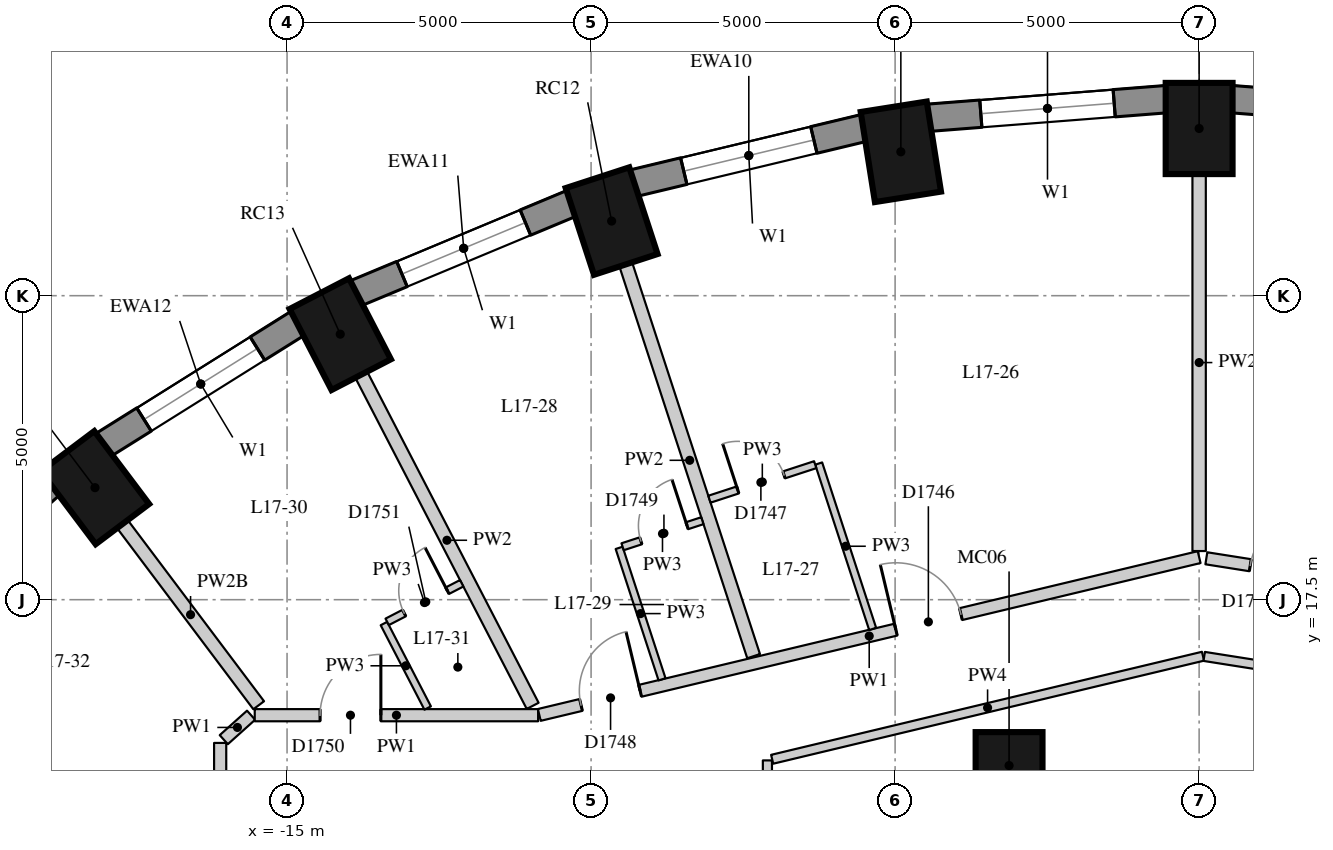
"""IFC4 building model, lengths in metres.
Left out: names, types, materials, properties, quantities, classifications, styles, units other than length and angle.
Written with IfcOpenShell. Run it as: python <this file> out.ifc"""

import sys

from ifc_helpers import new_model, si_unit, direction, frame, frame_2d, origin, origin_2d, place, context, subcontext, project, spatial, rectangle, extrude, element, fill, save


model = new_model("IFC4")
c1 = context("Model", 3, precision=1e-05, world=origin(), true_north=direction((0.0, 1.0)))
c2 = subcontext(c1, "Body", "Model", "MODEL_VIEW")
j1 = project(units=[si_unit("LENGTHUNIT", "METRE"), si_unit("PLANEANGLEUNIT", "RADIAN")], contexts=[c1])
p1 = place(None, origin())
s1 = spatial("IfcSite", under=j1, at=p1, CompositionType="ELEMENT")
p2 = place(p1, origin())
s2 = spatial("IfcBuilding", under=s1, at=p2, CompositionType="ELEMENT")
p3 = place(p2, frame((0.0, 0.0, 64.6)))
s3 = spatial("IfcBuildingStorey", under=s2, at=p3, CompositionType="ELEMENT", Elevation=64.6)
for number, where, z_axis, x_axis in (
    (1, (0.0, 25.25, 0.0), (0.0, 0.0, 1.0), (0.0, 1.0, 0.0)),
    (2, (-4.906, 24.866, 0.0), (0.0, 0.0, 1.0), (-0.156, 0.988, 0.0)),
    (3, (-9.662, 23.727, 0.0), (0.0, 0.0, 1.0), (-0.31, 0.951, 0.0)),
    (4, (-14.125, 21.867, 0.0), (0.0, 0.0, 1.0), (-0.46, 0.888, 0.0)),
    (5, (-18.159, 19.343, 0.0), (0.0, 0.0, 1.0), (-0.601, 0.799, 0.0)),
):
    element("IfcColumn", number, at=place(p3, frame(where, z_axis=z_axis, x_axis=x_axis)), inside=s3, PredefinedType="COLUMN", context=c2, shape_type="SweptSolid", body=[
        extrude(rectangle(XDim=1.5, YDim=1.1, at=origin_2d()), origin(), (0.0, 0.0, 1.0), 3.3),
    ])
p4 = place(p3, frame((-3.126, 14.772, 0.0), z_axis=(0.0, 0.0, 1.0), x_axis=(1.0, 0.0, 0.0)))
e6 = element("IfcColumn", 6, at=p4, inside=s3, PredefinedType="COLUMN", context=c2, shape_type="SweptSolid", body=[
    extrude(rectangle(XDim=1.1, YDim=1.1, at=origin_2d()), origin(), (0.0, 0.0, 1.0), 3.3),
])
p5 = place(p3, frame((4.457, 25.426, 0.0), z_axis=(0.0, 0.0, 1.0), x_axis=(-0.996955972145, 0.077966592873, 0.0)))
e7 = element("IfcWall", 7, at=p5, inside=s3, PredefinedType="SOLIDWALL", context=c2, shape_type="SweptSolid", body=[
    extrude(rectangle(XDim=3.939, YDim=0.45, at=frame_2d((1.97, 0.0))), origin(), (0.0, 0.0, 1.0), 3.02),
])
p6 = place(p5, frame((0.87, 0.0, 0.4)))
e8 = element("IfcOpeningElement", 8, at=p6, cuts=e7, PredefinedType="OPENING", context=c2, shape_type="SweptSolid", body=[
    extrude(rectangle(XDim=2.2, YDim=1.75, at=frame_2d((1.1, 0.875))), frame((0.0, 0.235, 0.0), z_axis=(0.0, -1.0, 0.0), x_axis=(1.0, 0.0, 0.0)), (0.0, 0.0, 1.0), 0.47),
])
p7 = place(p3, frame((-0.53, 25.733, 0.0), z_axis=(0.0, 0.0, 1.0), x_axis=(-0.996955972145, -0.077966592873, 0.0)))
e9 = element("IfcWall", 9, at=p7, inside=s3, PredefinedType="SOLIDWALL", context=c2, shape_type="SweptSolid", body=[
    extrude(rectangle(XDim=3.939, YDim=0.45, at=frame_2d((1.97, 0.0))), origin(), (0.0, 0.0, 1.0), 3.02),
])
p8 = place(p7, frame((0.87, 0.0, 0.4)))
e10 = element("IfcOpeningElement", 10, at=p8, cuts=e9, PredefinedType="OPENING", context=c2, shape_type="SweptSolid", body=[
    extrude(rectangle(XDim=2.2, YDim=1.75, at=frame_2d((1.1, 0.875))), frame((0.0, 0.235, 0.0), z_axis=(0.0, -1.0, 0.0), x_axis=(1.0, 0.0, 0.0)), (0.0, 0.0, 1.0), 0.47),
])
p9 = place(p3, frame((-5.504, 25.26, 0.0), z_axis=(0.0, 0.0, 1.0), x_axis=(-0.972496561493, -0.232917233979, 0.0)))
e11 = element("IfcWall", 11, at=p9, inside=s3, PredefinedType="SOLIDWALL", context=c2, shape_type="SweptSolid", body=[
    extrude(rectangle(XDim=3.911, YDim=0.45, at=frame_2d((1.956, 0.0))), origin(), (0.0, 0.0, 1.0), 3.02),
])
p10 = place(p9, frame((0.855, 0.0, 0.4)))
e12 = element("IfcOpeningElement", 12, at=p10, cuts=e11, PredefinedType="OPENING", context=c2, shape_type="SweptSolid", body=[
    extrude(rectangle(XDim=2.2, YDim=1.75, at=frame_2d((1.1, 0.875))), frame((0.0, 0.235, 0.0), z_axis=(0.0, -1.0, 0.0), x_axis=(1.0, 0.0, 0.0)), (0.0, 0.0, 1.0), 0.47),
])
p11 = place(p3, frame((-10.315, 24.021, 0.0), z_axis=(0.0, 0.0, 1.0), x_axis=(-0.923031964282, -0.384723267966, 0.0)))
e13 = element("IfcWall", 13, at=p11, inside=s3, PredefinedType="SOLIDWALL", context=c2, shape_type="SweptSolid", body=[
    extrude(rectangle(XDim=3.856, YDim=0.45, at=frame_2d((1.928, 0.0))), origin(), (0.0, 0.0, 1.0), 3.02),
])
p12 = place(p11, frame((0.828, 0.0, 0.4)))
e14 = element("IfcOpeningElement", 14, at=p12, cuts=e13, PredefinedType="OPENING", context=c2, shape_type="SweptSolid", body=[
    extrude(rectangle(XDim=2.2, YDim=1.75, at=frame_2d((1.1, 0.875))), frame((0.0, 0.235, 0.0), z_axis=(0.0, -1.0, 0.0), x_axis=(1.0, 0.0, 0.0)), (0.0, 0.0, 1.0), 0.47),
])
p13 = place(p3, frame((-14.817, 22.051, 0.0), z_axis=(0.0, 0.0, 1.0), x_axis=(-0.847635480093, -0.530579016629, 0.0)))
e15 = element("IfcWall", 15, at=p13, inside=s3, PredefinedType="SOLIDWALL", context=c2, shape_type="SweptSolid", body=[
    extrude(rectangle(XDim=3.782, YDim=0.45, at=frame_2d((1.891, 0.0))), origin(), (0.0, 0.0, 1.0), 3.02),
])
p14 = place(p13, frame((0.791, 0.0, 0.4)))
e16 = element("IfcOpeningElement", 16, at=p14, cuts=e15, PredefinedType="OPENING", context=c2, shape_type="SweptSolid", body=[
    extrude(rectangle(XDim=2.2, YDim=1.75, at=frame_2d((1.1, 0.875))), frame((0.0, 0.235, 0.0), z_axis=(0.0, -1.0, 0.0), x_axis=(1.0, 0.0, 0.0)), (0.0, 0.0, 1.0), 0.47),
])
p15 = place(p3, frame((-18.871, 19.407, 0.0), z_axis=(0.0, 0.0, 1.0), x_axis=(-0.745526233716, -0.66647628228, 0.0)))
e17 = element("IfcWall", 17, at=p15, inside=s3, PredefinedType="SOLIDWALL", context=c2, shape_type="SweptSolid", body=[
    extrude(rectangle(XDim=3.697, YDim=0.45, at=frame_2d((1.848, 0.0))), origin(), (0.0, 0.0, 1.0), 3.02),
])
p16 = place(p15, frame((0.749, 0.0, 0.4)))
e18 = element("IfcOpeningElement", 18, at=p16, cuts=e17, PredefinedType="OPENING", context=c2, shape_type="SweptSolid", body=[
    extrude(rectangle(XDim=2.2, YDim=1.75, at=frame_2d((1.1, 0.875))), frame((0.0, 0.235, 0.0), z_axis=(0.0, -1.0, 0.0), x_axis=(1.0, 0.0, 0.0)), (0.0, 0.0, 1.0), 0.47),
])
p17 = place(p3, frame((-16.1, 11.047, 0.0), z_axis=(0.0, 0.0, 1.0), x_axis=(0.0, 1.0, 0.0)))
e19 = element("IfcWall", 19, at=p17, inside=s3, PredefinedType="PARTITIONING", context=c2, shape_type="SweptSolid", body=[
    extrude(rectangle(XDim=4.097, YDim=0.2, at=frame_2d((2.048, 0.0))), origin(), (0.0, 0.0, 1.0), 3.02),
])
p18 = place(p17, frame((1.499, 0.0, 0.0)))
e20 = element("IfcOpeningElement", 20, at=p18, cuts=e19, PredefinedType="OPENING", context=c2, shape_type="SweptSolid", body=[
    extrude(rectangle(XDim=1.1, YDim=2.1, at=frame_2d((0.55, 1.05))), frame((0.0, 0.11, 0.0), z_axis=(0.0, -1.0, 0.0), x_axis=(1.0, 0.0, 0.0)), (0.0, 0.0, 1.0), 0.22),
])
p19 = place(p3, frame((-16.041, 15.198, 0.0), z_axis=(0.0, 0.0, 1.0), x_axis=(0.744722115519, 0.667374685359, 0.0)))
e21 = element("IfcWall", 21, at=p19, inside=s3, PredefinedType="PARTITIONING", context=c2, shape_type="SweptSolid", body=[
    extrude(rectangle(XDim=0.603, YDim=0.2, at=frame_2d((0.301, 0.0))), origin(), (0.0, 0.0, 1.0), 3.02),
])
p20 = place(p3, frame((-15.531, 15.6, 0.0), z_axis=(0.0, 0.0, 1.0), x_axis=(1.0, 0.0, 0.0)))
e22 = element("IfcWall", 22, at=p20, inside=s3, PredefinedType="PARTITIONING", context=c2, shape_type="SweptSolid", body=[
    extrude(rectangle(XDim=4.66, YDim=0.2, at=frame_2d((2.33, 0.0))), origin(), (0.0, 0.0, 1.0), 3.02),
])
p21 = place(p20, frame((1.074, 0.0, 0.0)))
e23 = element("IfcOpeningElement", 23, at=p21, cuts=e22, PredefinedType="OPENING", context=c2, shape_type="SweptSolid", body=[
    extrude(rectangle(XDim=1.0, YDim=2.1, at=frame_2d((0.5, 1.05))), frame((0.0, 0.11, 0.0), z_axis=(0.0, -1.0, 0.0), x_axis=(1.0, 0.0, 0.0)), (0.0, 0.0, 1.0), 0.22),
])
p22 = place(p3, frame((-10.852, 15.605, 0.0), z_axis=(0.0, 0.0, 1.0), x_axis=(0.972573296372, 0.232596610431, 0.0)))
e24 = element("IfcWall", 24, at=p22, inside=s3, PredefinedType="PARTITIONING", context=c2, shape_type="SweptSolid", body=[
    extrude(rectangle(XDim=11.157, YDim=0.2, at=frame_2d((5.579, 0.0))), origin(), (0.0, 0.0, 1.0), 3.02),
])
p23 = place(p22, frame((6.029, 0.0, 0.0)))
e25 = element("IfcOpeningElement", 25, at=p23, cuts=e24, PredefinedType="OPENING", context=c2, shape_type="SweptSolid", body=[
    extrude(rectangle(XDim=1.1, YDim=2.1, at=frame_2d((0.55, 1.05))), frame((0.0, 0.11, 0.0), z_axis=(0.0, -1.0, 0.0), x_axis=(1.0, 0.0, 0.0)), (0.0, 0.0, 1.0), 0.22),
])
p24 = place(p22, frame((0.705, 0.0, 0.0)))
e26 = element("IfcOpeningElement", 26, at=p24, cuts=e24, PredefinedType="OPENING", context=c2, shape_type="SweptSolid", body=[
    extrude(rectangle(XDim=1.0, YDim=2.1, at=frame_2d((0.5, 1.05))), frame((0.0, 0.11, 0.0), z_axis=(0.0, -1.0, 0.0), x_axis=(1.0, 0.0, 0.0)), (0.0, 0.0, 1.0), 0.22),
])
p25 = place(p3, frame((0.119, 18.181, 0.0), z_axis=(0.0, 0.0, 1.0), x_axis=(0.987788122462, -0.155803161464, 0.0)))
e27 = element("IfcWall", 27, at=p25, inside=s3, PredefinedType="PARTITIONING", context=c2, shape_type="SweptSolid", body=[
    extrude(rectangle(XDim=7.471, YDim=0.2, at=frame_2d((3.736, 0.0))), origin(), (0.0, 0.0, 1.0), 3.02),
])
p26 = place(p25, frame((5.619, 0.0, 0.0)))
e28 = element("IfcOpeningElement", 28, at=p26, cuts=e27, PredefinedType="OPENING", context=c2, shape_type="SweptSolid", body=[
    extrude(rectangle(XDim=1.0, YDim=2.1, at=frame_2d((0.5, 1.05))), frame((0.0, 0.11, 0.0), z_axis=(0.0, -1.0, 0.0), x_axis=(1.0, 0.0, 0.0)), (0.0, 0.0, 1.0), 0.22),
])
p27 = place(p25, frame((0.732, 0.0, 0.0)))
e29 = element("IfcOpeningElement", 29, at=p27, cuts=e27, PredefinedType="OPENING", context=c2, shape_type="SweptSolid", body=[
    extrude(rectangle(XDim=1.0, YDim=2.1, at=frame_2d((0.5, 1.05))), frame((0.0, 0.11, 0.0), z_axis=(0.0, -1.0, 0.0), x_axis=(1.0, 0.0, 0.0)), (0.0, 0.0, 1.0), 0.22),
])
p28 = place(p3, frame((-7.1, 11.83, 0.0), z_axis=(0.0, 0.0, 1.0), x_axis=(0.0, 1.0, 0.0)))
e30 = element("IfcWall", 30, at=p28, inside=s3, PredefinedType="PARTITIONING", context=c2, shape_type="SweptSolid", body=[
    extrude(rectangle(XDim=3.027, YDim=0.15, at=frame_2d((1.513, 0.0))), origin(), (0.0, 0.0, 1.0), 3.02),
])
p29 = place(p3, frame((-7.022, 14.875, 0.0), z_axis=(0.0, 0.0, 1.0), x_axis=(0.972565872543, 0.232627650043, 0.0)))
e31 = element("IfcWall", 31, at=p29, inside=s3, PredefinedType="PARTITIONING", context=c2, shape_type="SweptSolid", body=[
    extrude(rectangle(XDim=7.286, YDim=0.15, at=frame_2d((3.643, 0.0))), origin(), (0.0, 0.0, 1.0), 3.02),
])
p30 = place(p3, frame((0.083, 16.567, 0.0), z_axis=(0.0, 0.0, 1.0), x_axis=(0.987781067139, -0.15584788546, 0.0)))
e32 = element("IfcWall", 32, at=p30, inside=s3, PredefinedType="PARTITIONING", context=c2, shape_type="SweptSolid", body=[
    extrude(rectangle(XDim=6.996, YDim=0.15, at=frame_2d((3.498, 0.0))), origin(), (0.0, 0.0, 1.0), 3.02),
])
p31 = place(p3, frame((0.0, 24.5, 0.0), z_axis=(0.0, 0.0, 1.0), x_axis=(0.0, -1.0, 0.0)))
e33 = element("IfcWall", 33, at=p31, inside=s3, PredefinedType="PARTITIONING", context=c2, shape_type="SweptSolid", body=[
    extrude(rectangle(XDim=6.2, YDim=0.22, at=frame_2d((3.1, 0.0))), origin(), (0.0, 0.0, 1.0), 2.47),
])
p32 = place(p3, frame((-9.429, 23.014, 0.0), z_axis=(0.0, 0.0, 1.0), x_axis=(0.310223739243, -0.950663574357, 0.0)))
e34 = element("IfcWall", 34, at=p32, inside=s3, PredefinedType="PARTITIONING", context=c2, shape_type="SweptSolid", body=[
    extrude(rectangle(XDim=6.778, YDim=0.22, at=frame_2d((3.389, 0.0))), origin(), (0.0, 0.0, 1.0), 3.02),
])
p33 = place(p3, frame((-13.78, 21.201, 0.0), z_axis=(0.0, 0.0, 1.0), x_axis=(0.459699000582, -0.888074787878, 0.0)))
e35 = element("IfcWall", 35, at=p33, inside=s3, PredefinedType="PARTITIONING", context=c2, shape_type="SweptSolid", body=[
    extrude(rectangle(XDim=6.134, YDim=0.22, at=frame_2d((3.067, 0.0))), origin(), (0.0, 0.0, 1.0), 3.02),
])
p34 = place(p3, frame((-17.708, 18.743, 0.0), z_axis=(0.0, 0.0, 1.0), x_axis=(0.601172757903, -0.799119086967, 0.0)))
e36 = element("IfcWall", 36, at=p34, inside=s3, PredefinedType="PARTITIONING", context=c2, shape_type="SweptSolid", body=[
    extrude(rectangle(XDim=3.729, YDim=0.22, at=frame_2d((1.864, 0.0))), origin(), (0.0, 0.0, 1.0), 2.57),
])
p35 = place(p3, frame((-21.093, 15.718, 0.0), z_axis=(0.0, 0.0, 1.0), x_axis=(0.73009284205, -0.683347965525, 0.0)))
e37 = element("IfcWall", 37, at=p35, inside=s3, PredefinedType="PARTITIONING", context=c2, shape_type="SweptSolid", body=[
    extrude(rectangle(XDim=6.602, YDim=0.22, at=frame_2d((3.301, 0.0))), origin(), (0.0, 0.0, 1.0), 3.02),
])
p36 = place(p3, frame((-5.369, 17.019, 0.0), z_axis=(0.0, 0.0, 1.0), x_axis=(-0.310231838646, 0.950660931295, 0.0)))
e38 = element("IfcWall", 38, at=p36, inside=s3, PredefinedType="PARTITIONING", context=c2, shape_type="SweptSolid", body=[
    extrude(rectangle(XDim=2.861, YDim=0.12, at=frame_2d((1.431, 0.0))), origin(), (0.0, 0.0, 1.0), 3.02),
])
p37 = place(p3, frame((-8.833, 16.19, 0.0), z_axis=(0.0, 0.0, 1.0), x_axis=(-0.310231525188, 0.950661033586, 0.0)))
e39 = element("IfcWall", 39, at=p37, inside=s3, PredefinedType="PARTITIONING", context=c2, shape_type="SweptSolid", body=[
    extrude(rectangle(XDim=2.274, YDim=0.12, at=frame_2d((1.137, 0.0))), origin(), (0.0, 0.0, 1.0), 3.02),
])
p38 = place(p3, frame((-12.687, 15.718, 0.0), z_axis=(0.0, 0.0, 1.0), x_axis=(-0.459775159711, 0.888035361071, 0.0)))
e40 = element("IfcWall", 40, at=p38, inside=s3, PredefinedType="PARTITIONING", context=c2, shape_type="SweptSolid", body=[
    extrude(rectangle(XDim=1.565, YDim=0.12, at=frame_2d((0.782, 0.0))), origin(), (0.0, 0.0, 1.0), 3.02),
])
p39 = place(p3, frame((-6.314, 19.72, 0.0), z_axis=(0.0, 0.0, 1.0), x_axis=(-0.950639191072, -0.310298450524, 0.0)))
e41 = element("IfcWall", 41, at=p39, inside=s3, PredefinedType="PARTITIONING", context=c2, shape_type="SweptSolid", body=[
    extrude(rectangle(XDim=1.83, YDim=0.12, at=frame_2d((0.915, 0.0))), origin(), (0.0, 0.0, 1.0), 3.02),
])
p40 = place(p39, frame((0.54, 0.0, 0.0)))
e42 = element("IfcOpeningElement", 42, at=p40, cuts=e41, PredefinedType="OPENING", context=c2, shape_type="SweptSolid", body=[
    extrude(rectangle(XDim=0.8, YDim=2.1, at=frame_2d((0.4, 1.05))), frame((0.0, 0.07, 0.0), z_axis=(0.0, -1.0, 0.0), x_axis=(1.0, 0.0, 0.0)), (0.0, 0.0, 1.0), 0.14),
])
p41 = place(p3, frame((-9.481, 18.371, 0.0), z_axis=(0.0, 0.0, 1.0), x_axis=(0.950576687533, 0.310489872812, 0.0)))
e43 = element("IfcWall", 43, at=p41, inside=s3, PredefinedType="PARTITIONING", context=c2, shape_type="SweptSolid", body=[
    extrude(rectangle(XDim=1.38, YDim=0.12, at=frame_2d((0.69, 0.0))), origin(), (0.0, 0.0, 1.0), 3.02),
])
p42 = place(p41, frame((0.315, 0.0, 0.0)))
e44 = element("IfcOpeningElement", 44, at=p42, cuts=e43, PredefinedType="OPENING", context=c2, shape_type="SweptSolid", body=[
    extrude(rectangle(XDim=0.8, YDim=2.1, at=frame_2d((0.4, 1.05))), frame((0.0, 0.07, 0.0), z_axis=(0.0, -1.0, 0.0), x_axis=(1.0, 0.0, 0.0)), (0.0, 0.0, 1.0), 0.14),
])
p43 = place(p3, frame((-13.353, 17.135, 0.0), z_axis=(0.0, 0.0, 1.0), x_axis=(0.888075681402, 0.459697274413, 0.0)))
e45 = element("IfcWall", 45, at=p43, inside=s3, PredefinedType="PARTITIONING", context=c2, shape_type="SweptSolid", body=[
    extrude(rectangle(XDim=1.38, YDim=0.12, at=frame_2d((0.69, 0.0))), origin(), (0.0, 0.0, 1.0), 3.02),
])
p44 = place(p43, frame((0.315, 0.0, 0.0)))
e46 = element("IfcOpeningElement", 46, at=p44, cuts=e45, PredefinedType="OPENING", context=c2, shape_type="SweptSolid", body=[
    extrude(rectangle(XDim=0.8, YDim=2.1, at=frame_2d((0.4, 1.05))), frame((0.0, 0.07, 0.0), z_axis=(0.0, -1.0, 0.0), x_axis=(1.0, 0.0, 0.0)), (0.0, 0.0, 1.0), 0.14),
])
p45 = place(p8, origin())
e47 = element("IfcWindow", 47, at=p45, inside=s3, PartitioningType="SINGLE_PANEL", PredefinedType="WINDOW", context=c2, shape_type="SweptSolid", body=[
    extrude(rectangle(XDim=2.2, YDim=1.75, at=frame_2d((1.1, 0.875))), frame((0.0, 0.035, 0.0), z_axis=(0.0, -1.0, 0.0), x_axis=(1.0, 0.0, 0.0)), (0.0, 0.0, 1.0), 0.06),
])
fill(e10, e47)
p46 = place(p10, origin())
e48 = element("IfcWindow", 48, at=p46, inside=s3, PartitioningType="SINGLE_PANEL", PredefinedType="WINDOW", context=c2, shape_type="SweptSolid", body=[
    extrude(rectangle(XDim=2.2, YDim=1.75, at=frame_2d((1.1, 0.875))), frame((0.0, 0.035, 0.0), z_axis=(0.0, -1.0, 0.0), x_axis=(1.0, 0.0, 0.0)), (0.0, 0.0, 1.0), 0.06),
])
fill(e12, e48)
p47 = place(p12, origin())
e49 = element("IfcWindow", 49, at=p47, inside=s3, PartitioningType="SINGLE_PANEL", PredefinedType="WINDOW", context=c2, shape_type="SweptSolid", body=[
    extrude(rectangle(XDim=2.2, YDim=1.75, at=frame_2d((1.1, 0.875))), frame((0.0, 0.035, 0.0), z_axis=(0.0, -1.0, 0.0), x_axis=(1.0, 0.0, 0.0)), (0.0, 0.0, 1.0), 0.06),
])
fill(e14, e49)
p48 = place(p14, origin())
e50 = element("IfcWindow", 50, at=p48, inside=s3, PartitioningType="SINGLE_PANEL", PredefinedType="WINDOW", context=c2, shape_type="SweptSolid", body=[
    extrude(rectangle(XDim=2.2, YDim=1.75, at=frame_2d((1.1, 0.875))), frame((0.0, 0.035, 0.0), z_axis=(0.0, -1.0, 0.0), x_axis=(1.0, 0.0, 0.0)), (0.0, 0.0, 1.0), 0.06),
])
fill(e16, e50)
p49 = place(p27, origin())
e51 = element("IfcDoor", 51, at=p49, inside=s3, OperationType="SINGLE_SWING_RIGHT", PredefinedType="DOOR", context=c2, shape_type="SweptSolid", body=[
    extrude(rectangle(XDim=1.0, YDim=2.1, at=frame_2d((0.5, 1.05))), frame((0.0, 0.025, 0.0), z_axis=(0.0, -1.0, 0.0), x_axis=(1.0, 0.0, 0.0)), (0.0, 0.0, 1.0), 0.05),
])
fill(e29, e51)
p50 = place(p23, origin())
e52 = element("IfcDoor", 52, at=p50, inside=s3, OperationType="SINGLE_SWING_LEFT", PredefinedType="DOOR", context=c2, shape_type="SweptSolid", body=[
    extrude(rectangle(XDim=1.1, YDim=2.1, at=frame_2d((0.55, 1.05))), frame((0.0, 0.025, 0.0), z_axis=(0.0, -1.0, 0.0), x_axis=(1.0, 0.0, 0.0)), (0.0, 0.0, 1.0), 0.05),
])
fill(e25, e52)
p51 = place(p40, origin())
e53 = element("IfcDoor", 53, at=p51, inside=s3, OperationType="SINGLE_SWING_LEFT", PredefinedType="DOOR", context=c2, shape_type="SweptSolid", body=[
    extrude(rectangle(XDim=0.8, YDim=2.1, at=frame_2d((0.4, 1.05))), frame((0.0, 0.025, 0.0), z_axis=(0.0, -1.0, 0.0), x_axis=(1.0, 0.0, 0.0)), (0.0, 0.0, 1.0), 0.05),
])
fill(e42, e53)
p52 = place(p24, origin())
e54 = element("IfcDoor", 54, at=p52, inside=s3, OperationType="SINGLE_SWING_RIGHT", PredefinedType="DOOR", context=c2, shape_type="SweptSolid", body=[
    extrude(rectangle(XDim=1.0, YDim=2.1, at=frame_2d((0.5, 1.05))), frame((0.0, 0.025, 0.0), z_axis=(0.0, -1.0, 0.0), x_axis=(1.0, 0.0, 0.0)), (0.0, 0.0, 1.0), 0.05),
])
fill(e26, e54)
p53 = place(p42, origin())
e55 = element("IfcDoor", 55, at=p53, inside=s3, OperationType="SINGLE_SWING_RIGHT", PredefinedType="DOOR", context=c2, shape_type="SweptSolid", body=[
    extrude(rectangle(XDim=0.8, YDim=2.1, at=frame_2d((0.4, 1.05))), frame((0.0, 0.025, 0.0), z_axis=(0.0, -1.0, 0.0), x_axis=(1.0, 0.0, 0.0)), (0.0, 0.0, 1.0), 0.05),
])
fill(e44, e55)
p54 = place(p21, origin())
e56 = element("IfcDoor", 56, at=p54, inside=s3, OperationType="SINGLE_SWING_RIGHT", PredefinedType="DOOR", context=c2, shape_type="SweptSolid", body=[
    extrude(rectangle(XDim=1.0, YDim=2.1, at=frame_2d((0.5, 1.05))), frame((0.0, 0.025, 0.0), z_axis=(0.0, -1.0, 0.0), x_axis=(1.0, 0.0, 0.0)), (0.0, 0.0, 1.0), 0.05),
])
fill(e23, e56)
p55 = place(p44, origin())
e57 = element("IfcDoor", 57, at=p55, inside=s3, OperationType="SINGLE_SWING_RIGHT", PredefinedType="DOOR", context=c2, shape_type="SweptSolid", body=[
    extrude(rectangle(XDim=0.8, YDim=2.1, at=frame_2d((0.4, 1.05))), frame((0.0, 0.025, 0.0), z_axis=(0.0, -1.0, 0.0), x_axis=(1.0, 0.0, 0.0)), (0.0, 0.0, 1.0), 0.05),
])
fill(e46, e57)
save(model, sys.argv[1])
